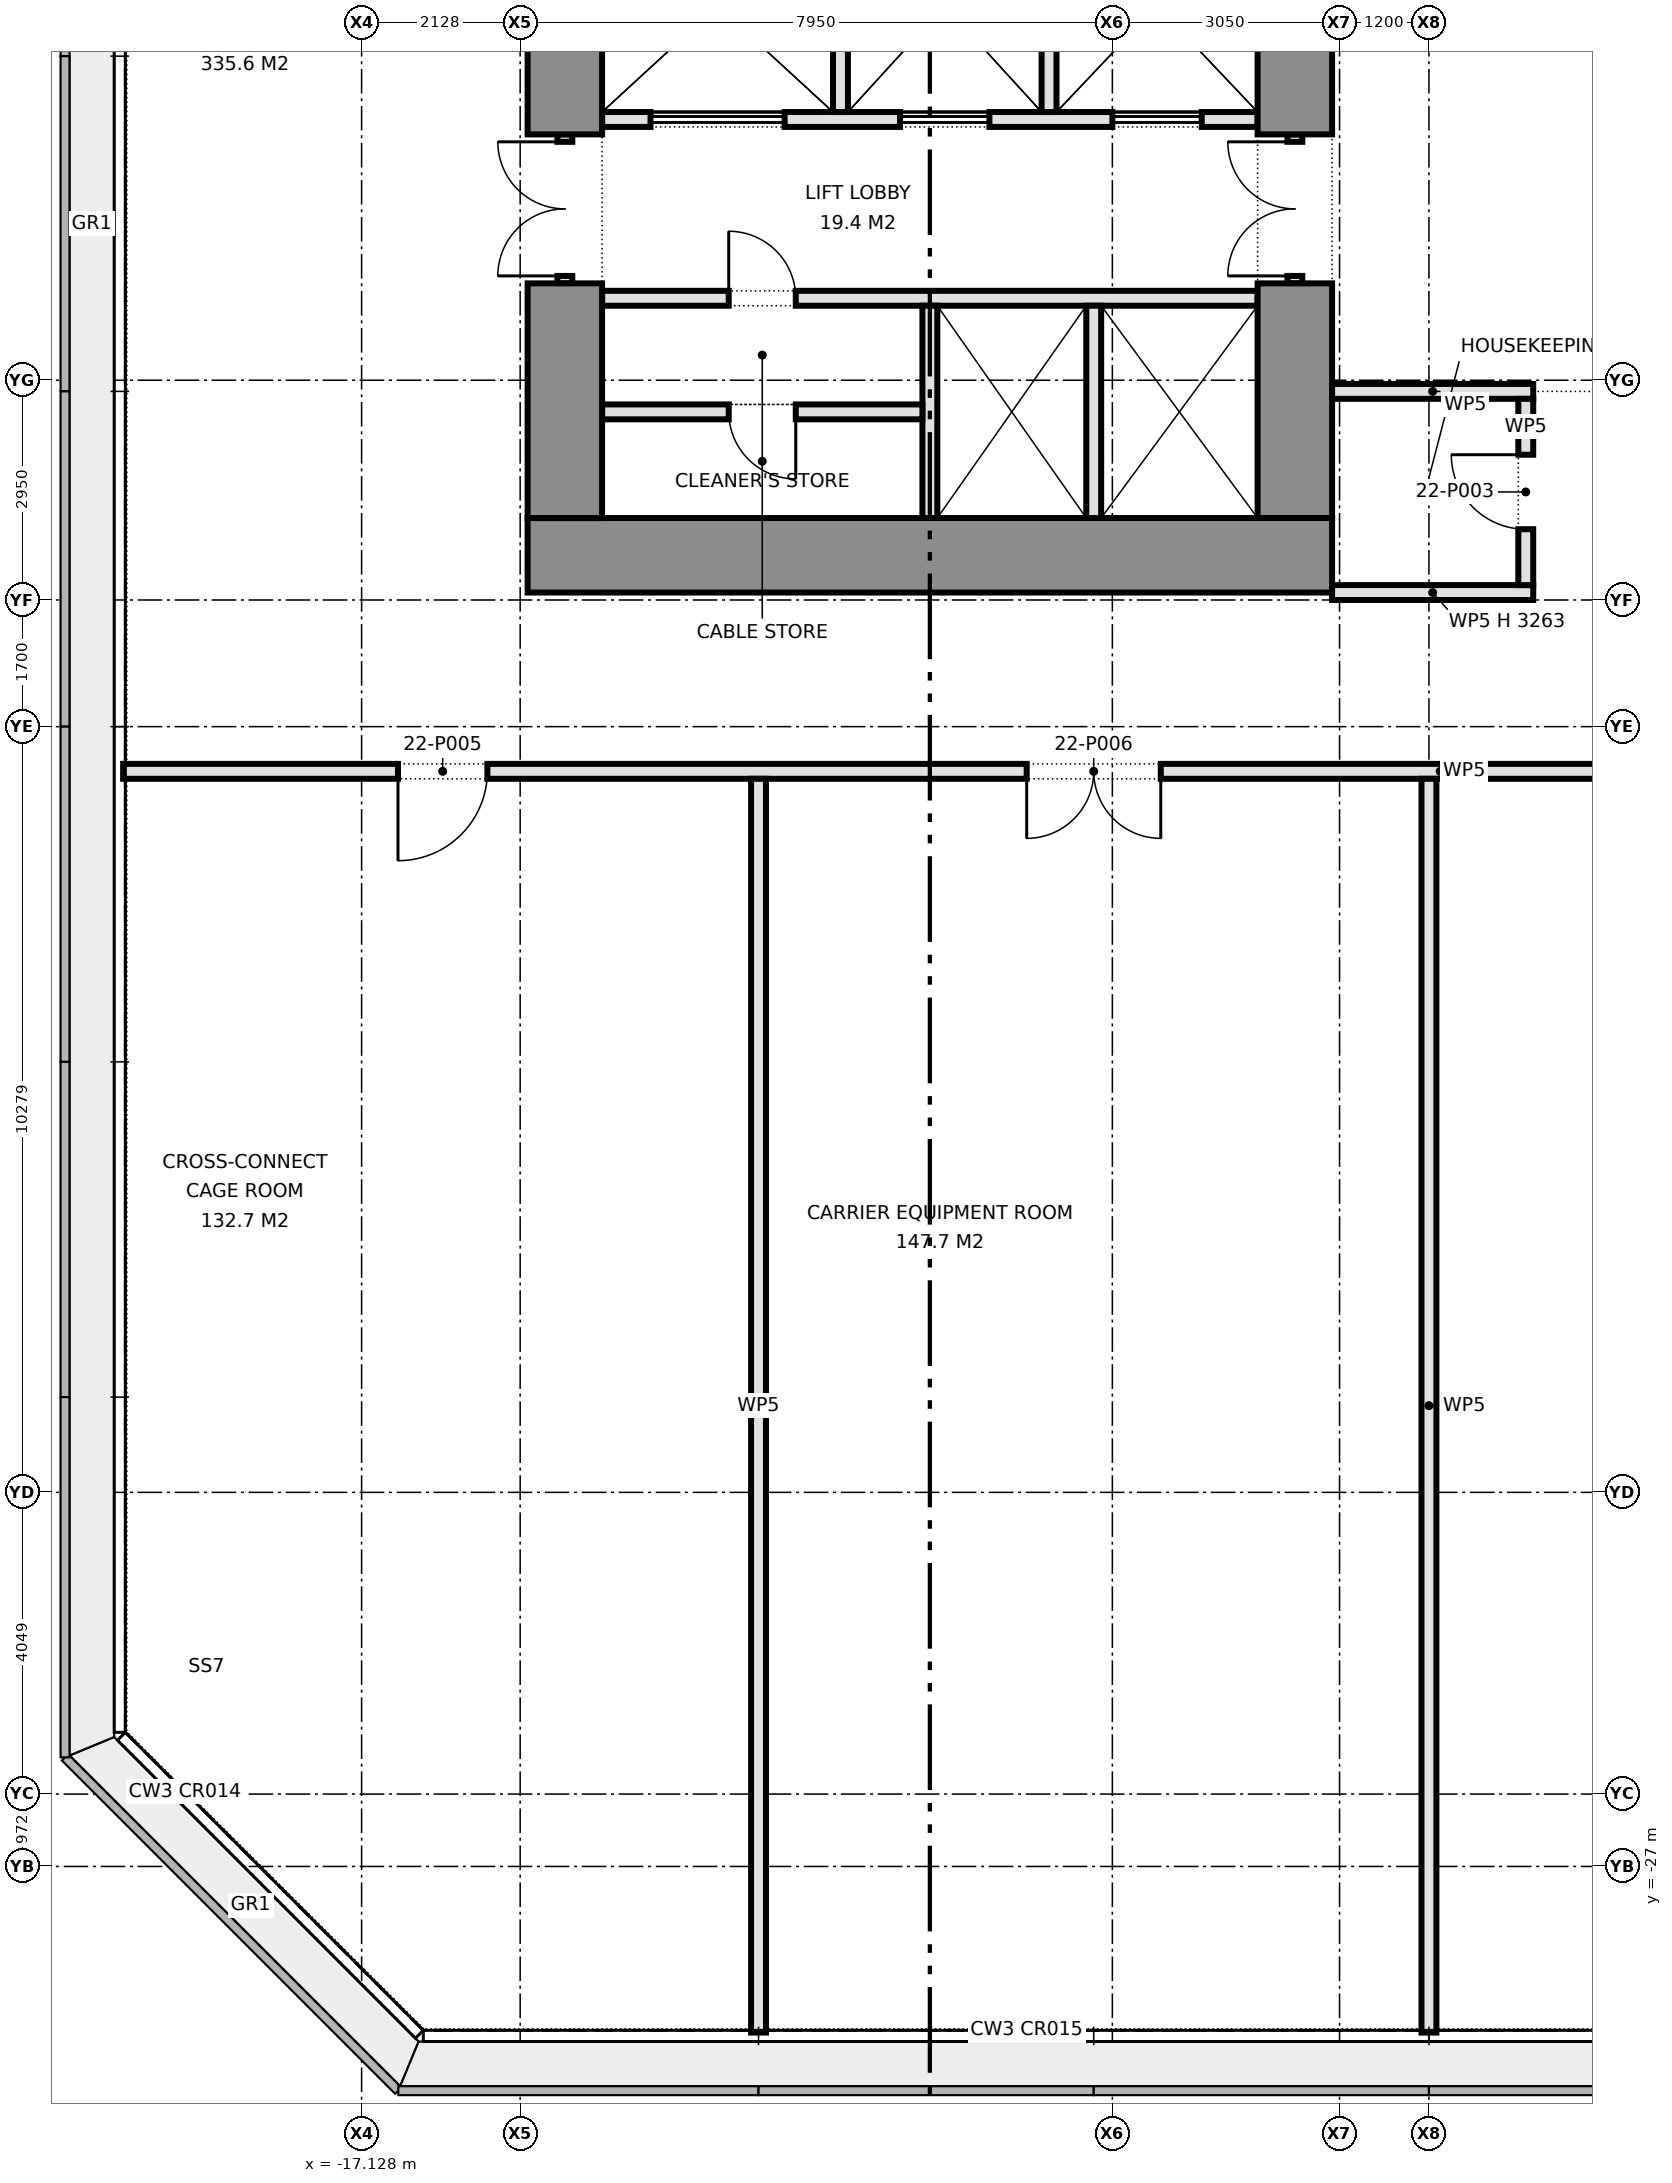
"""IFC4 building model, lengths in metres.
Left out: names, types, materials, properties, quantities, classifications, styles, units other than length and angle.
Written with IfcOpenShell. Run it as: python <this file> out.ifc"""

import sys

from ifc_helpers import new_model, si_unit, direction, frame, frame_2d, origin, place, context, subcontext, project, spatial, rectangle, extrude, element, fill, save


model = new_model("IFC4")
c1 = context("Model", 3, precision=1e-05, world=origin(), true_north=direction((0.0, 1.0)))
c2 = subcontext(c1, "Body", "Model", "MODEL_VIEW")
j1 = project(units=[si_unit("LENGTHUNIT", "METRE"), si_unit("PLANEANGLEUNIT", "RADIAN")], contexts=[c1])
p1 = place(None, origin())
s1 = spatial("IfcSite", under=j1, at=p1, CompositionType="ELEMENT")
p2 = place(p1, origin())
s2 = spatial("IfcBuilding", under=s1, at=p2, CompositionType="ELEMENT")
p3 = place(p2, frame((0.0, 0.0, 99.6)))
s3 = spatial("IfcBuildingStorey", under=s2, at=p3, CompositionType="ELEMENT", Elevation=99.6)
p4 = place(p3, frame((-14.9, -9.4, 0.0), z_axis=(0.0, 0.0, 1.0), x_axis=(1.0, 0.0, 0.0)))
e1 = element("IfcWall", 1, at=p4, inside=s3, PredefinedType="SHEAR", context=c2, shape_type="SweptSolid", body=[
    extrude(rectangle(XDim=10.8, YDim=1.0, at=frame_2d((5.4, 0.0))), origin(), (0.0, 0.0, 1.0), 4.2),
])
p5 = place(p3, frame((-14.4, -8.9, 0.0), z_axis=(0.0, 0.0, 1.0), x_axis=(0.0, 1.0, 0.0)))
e2 = element("IfcWall", 2, at=p5, inside=s3, PredefinedType="SHEAR", context=c2, shape_type="SweptSolid", body=[
    extrude(rectangle(XDim=3.15, YDim=1.0, at=frame_2d((1.575, 0.0))), origin(), (0.0, 0.0, 1.0), 4.2),
])
p6 = place(p3, frame((-14.4, -5.75, 0.0), z_axis=(0.0, 0.0, 1.0), x_axis=(0.0, 1.0, 0.0)))
e3 = element("IfcWall", 3, at=p6, inside=s3, PredefinedType="PARTITIONING", context=c2, shape_type="SweptSolid", body=[
    extrude(rectangle(XDim=2.0, YDim=0.2, at=frame_2d((1.0, 0.0))), origin(), (0.0, 0.0, 1.0), 2.4),
])
p7 = place(p6, frame((0.1, 0.0, 0.0)))
e4 = element("IfcOpeningElement", 4, at=p7, cuts=e3, PredefinedType="OPENING", context=c2, shape_type="SweptSolid", body=[
    extrude(rectangle(XDim=1.8, YDim=2.1, at=frame_2d((0.9, 1.05))), frame((0.0, 0.11, 0.0), z_axis=(0.0, -1.0, 0.0), x_axis=(1.0, 0.0, 0.0)), (0.0, 0.0, 1.0), 0.22),
])
p8 = place(p3, frame((-14.4, -3.75, 0.0), z_axis=(0.0, 0.0, 1.0), x_axis=(0.0, 1.0, 0.0)))
e5 = element("IfcWall", 5, at=p8, inside=s3, PredefinedType="SHEAR", context=c2, shape_type="SweptSolid", body=[
    extrude(rectangle(XDim=6.13, YDim=1.0, at=frame_2d((3.065, 0.0))), origin(), (0.0, 0.0, 1.0), 4.2),
])
p9 = place(p3, frame((-4.6, -8.9, 0.0), z_axis=(0.0, 0.0, 1.0), x_axis=(0.0, 1.0, 0.0)))
e6 = element("IfcWall", 6, at=p9, inside=s3, PredefinedType="SHEAR", context=c2, shape_type="SweptSolid", body=[
    extrude(rectangle(XDim=3.15, YDim=1.0, at=frame_2d((1.575, 0.0))), origin(), (0.0, 0.0, 1.0), 4.2),
])
p10 = place(p3, frame((-4.6, -5.75, 0.0), z_axis=(0.0, 0.0, 1.0), x_axis=(0.0, 1.0, 0.0)))
e7 = element("IfcWall", 7, at=p10, inside=s3, PredefinedType="PARTITIONING", context=c2, shape_type="SweptSolid", body=[
    extrude(rectangle(XDim=2.0, YDim=0.2, at=frame_2d((1.0, 0.0))), origin(), (0.0, 0.0, 1.0), 2.4),
])
p11 = place(p10, frame((0.1, 0.0, 0.0)))
e8 = element("IfcOpeningElement", 8, at=p11, cuts=e7, PredefinedType="OPENING", context=c2, shape_type="SweptSolid", body=[
    extrude(rectangle(XDim=1.8, YDim=2.1, at=frame_2d((0.9, 1.05))), frame((0.0, 0.11, 0.0), z_axis=(0.0, -1.0, 0.0), x_axis=(1.0, 0.0, 0.0)), (0.0, 0.0, 1.0), 0.22),
])
p12 = place(p3, frame((-4.6, -3.75, 0.0), z_axis=(0.0, 0.0, 1.0), x_axis=(0.0, 1.0, 0.0)))
e9 = element("IfcWall", 9, at=p12, inside=s3, PredefinedType="SHEAR", context=c2, shape_type="SweptSolid", body=[
    extrude(rectangle(XDim=4.0, YDim=1.0, at=frame_2d((2.0, 0.0))), origin(), (0.0, 0.0, 1.0), 4.2),
])
p13 = place(p3, frame((-13.9, -5.95, 0.0), z_axis=(0.0, 0.0, 1.0), x_axis=(1.0, 0.0, 0.0)))
e10 = element("IfcWall", 10, at=p13, inside=s3, PredefinedType="PARTITIONING", context=c2, shape_type="SweptSolid", body=[
    extrude(rectangle(XDim=8.8, YDim=0.2, at=frame_2d((4.4, 0.0))), origin(), (0.0, 0.0, 1.0), 4.2),
])
p14 = place(p13, frame((1.7, 0.0, 0.0)))
e11 = element("IfcOpeningElement", 11, at=p14, cuts=e10, PredefinedType="OPENING", context=c2, shape_type="SweptSolid", body=[
    extrude(rectangle(XDim=0.9, YDim=2.1, at=frame_2d((0.45, 1.05))), frame((0.0, 0.11, 0.0), z_axis=(0.0, -1.0, 0.0), x_axis=(1.0, 0.0, 0.0)), (0.0, 0.0, 1.0), 0.22),
])
p15 = place(p3, frame((-13.9, -3.55, 0.0), z_axis=(0.0, 0.0, 1.0), x_axis=(1.0, 0.0, 0.0)))
e12 = element("IfcWall", 12, at=p15, inside=s3, PredefinedType="PARTITIONING", context=c2, shape_type="SweptSolid", body=[
    extrude(rectangle(XDim=8.8, YDim=0.2, at=frame_2d((4.4, 0.0))), origin(), (0.0, 0.0, 1.0), 4.2),
])
p16 = place(p15, frame((0.65, 0.0, 0.0)))
e13 = element("IfcOpeningElement", 13, at=p16, cuts=e12, PredefinedType="OPENING", context=c2, shape_type="SweptSolid", body=[
    extrude(rectangle(XDim=1.8, YDim=2.1, at=frame_2d((0.9, 1.05))), frame((0.0, 0.11, 0.0), z_axis=(0.0, -1.0, 0.0), x_axis=(1.0, 0.0, 0.0)), (0.0, 0.0, 1.0), 0.22),
])
p17 = place(p15, frame((4.0, 0.0, 0.0)))
e14 = element("IfcOpeningElement", 14, at=p17, cuts=e12, PredefinedType="OPENING", context=c2, shape_type="SweptSolid", body=[
    extrude(rectangle(XDim=1.2, YDim=2.1, at=frame_2d((0.6, 1.05))), frame((0.0, 0.11, 0.0), z_axis=(0.0, -1.0, 0.0), x_axis=(1.0, 0.0, 0.0)), (0.0, 0.0, 1.0), 0.22),
])
p18 = place(p15, frame((6.85, 0.0, 0.0)))
e15 = element("IfcOpeningElement", 15, at=p18, cuts=e12, PredefinedType="OPENING", context=c2, shape_type="SweptSolid", body=[
    extrude(rectangle(XDim=1.2, YDim=2.1, at=frame_2d((0.6, 1.05))), frame((0.0, 0.11, 0.0), z_axis=(0.0, -1.0, 0.0), x_axis=(1.0, 0.0, 0.0)), (0.0, 0.0, 1.0), 0.22),
])
for number, where, z_axis, x_axis in (
    (16, (-9.5, -8.9, 0.0), (0.0, 0.0, 1.0), (0.0, 1.0, 0.0)),
    (17, (-7.3, -8.9, 0.0), (0.0, 0.0, 1.0), (0.0, 1.0, 0.0)),
):
    element("IfcWall", number, at=place(p3, frame(where, z_axis=z_axis, x_axis=x_axis)), inside=s3, PredefinedType="PARTITIONING", context=c2, shape_type="SweptSolid", body=[
        extrude(rectangle(XDim=2.85, YDim=0.2, at=frame_2d((1.425, 0.0))), origin(), (0.0, 0.0, 1.0), 4.2),
    ])
p19 = place(p3, frame((-13.9, -7.475, 0.0), z_axis=(0.0, 0.0, 1.0), x_axis=(1.0, 0.0, 0.0)))
e18 = element("IfcWall", 18, at=p19, inside=s3, PredefinedType="PARTITIONING", context=c2, shape_type="SweptSolid", body=[
    extrude(rectangle(XDim=4.3, YDim=0.2, at=frame_2d((2.15, 0.0))), origin(), (0.0, 0.0, 1.0), 4.2),
])
p20 = place(p19, frame((1.7, 0.0, 0.0)))
e19 = element("IfcOpeningElement", 19, at=p20, cuts=e18, PredefinedType="OPENING", context=c2, shape_type="SweptSolid", body=[
    extrude(rectangle(XDim=0.9, YDim=2.1, at=frame_2d((0.45, 1.05))), frame((0.0, 0.11, 0.0), z_axis=(0.0, -1.0, 0.0), x_axis=(1.0, 0.0, 0.0)), (0.0, 0.0, 1.0), 0.22),
])
for number, where, z_axis, x_axis in (
    (20, (-10.7, -3.45, 0.0), (0.0, 0.0, 1.0), (0.0, 1.0, 0.0)),
    (21, (-7.9, -3.45, 0.0), (0.0, 0.0, 1.0), (0.0, 1.0, 0.0)),
):
    element("IfcWall", number, at=place(p3, frame(where, z_axis=z_axis, x_axis=x_axis)), inside=s3, PredefinedType="PARTITIONING", context=c2, shape_type="SweptSolid", body=[
        extrude(rectangle(XDim=2.85, YDim=0.2, at=frame_2d((1.425, 0.0))), origin(), (0.0, 0.0, 1.0), 4.2),
    ])
p21 = place(p3, frame((-20.33, -12.3, 0.0), z_axis=(0.0, 0.0, 1.0), x_axis=(1.0, 0.0, 0.0)))
e22 = element("IfcWall", 22, at=p21, inside=s3, PredefinedType="PARTITIONING", context=c2, shape_type="SweptSolid", body=[
    extrude(rectangle(XDim=37.73, YDim=0.2, at=frame_2d((18.865, 0.0))), origin(), (0.0, 0.0, 1.0), 4.2),
])
p22 = place(p21, frame((3.69, 0.0, 0.0)))
e23 = element("IfcOpeningElement", 23, at=p22, cuts=e22, PredefinedType="OPENING", context=c2, shape_type="SweptSolid", body=[
    extrude(rectangle(XDim=1.2, YDim=2.1, at=frame_2d((0.6, 1.05))), frame((0.0, 0.11, 0.0), z_axis=(0.0, -1.0, 0.0), x_axis=(1.0, 0.0, 0.0)), (0.0, 0.0, 1.0), 0.22),
])
p23 = place(p21, frame((12.13, 0.0, 0.0)))
e24 = element("IfcOpeningElement", 24, at=p23, cuts=e22, PredefinedType="OPENING", context=c2, shape_type="SweptSolid", body=[
    extrude(rectangle(XDim=1.8, YDim=2.1, at=frame_2d((0.9, 1.05))), frame((0.0, 0.11, 0.0), z_axis=(0.0, -1.0, 0.0), x_axis=(1.0, 0.0, 0.0)), (0.0, 0.0, 1.0), 0.22),
])
p24 = place(p21, frame((21.43, 0.0, 0.0)))
e25 = element("IfcOpeningElement", 25, at=p24, cuts=e22, PredefinedType="OPENING", context=c2, shape_type="SweptSolid", body=[
    extrude(rectangle(XDim=1.2, YDim=2.1, at=frame_2d((0.6, 1.05))), frame((0.0, 0.11, 0.0), z_axis=(0.0, -1.0, 0.0), x_axis=(1.0, 0.0, 0.0)), (0.0, 0.0, 1.0), 0.22),
])
p25 = place(p21, frame((35.285, 0.0, 0.0)))
e26 = element("IfcOpeningElement", 26, at=p25, cuts=e22, PredefinedType="OPENING", context=c2, shape_type="SweptSolid", body=[
    extrude(rectangle(XDim=1.8, YDim=2.1, at=frame_2d((0.9, 1.05))), frame((0.0, 0.11, 0.0), z_axis=(0.0, -1.0, 0.0), x_axis=(1.0, 0.0, 0.0)), (0.0, 0.0, 1.0), 0.22),
])
p26 = place(p21, frame((27.53, 0.0, 0.0)))
e27 = element("IfcOpeningElement", 27, at=p26, cuts=e22, PredefinedType="OPENING", context=c2, shape_type="SweptSolid", body=[
    extrude(rectangle(XDim=1.0, YDim=2.1, at=frame_2d((0.5, 1.05))), frame((0.0, 0.11, 0.0), z_axis=(0.0, -1.0, 0.0), x_axis=(1.0, 0.0, 0.0)), (0.0, 0.0, 1.0), 0.22),
])
p27 = place(p21, frame((30.53, 0.0, 0.0)))
e28 = element("IfcOpeningElement", 28, at=p27, cuts=e22, PredefinedType="OPENING", context=c2, shape_type="SweptSolid", body=[
    extrude(rectangle(XDim=1.0, YDim=2.1, at=frame_2d((0.5, 1.05))), frame((0.0, 0.11, 0.0), z_axis=(0.0, -1.0, 0.0), x_axis=(1.0, 0.0, 0.0)), (0.0, 0.0, 1.0), 0.22),
])
p28 = place(p21, frame((33.13, 0.0, 0.0)))
e29 = element("IfcOpeningElement", 29, at=p28, cuts=e22, PredefinedType="OPENING", context=c2, shape_type="SweptSolid", body=[
    extrude(rectangle(XDim=1.0, YDim=2.1, at=frame_2d((0.5, 1.05))), frame((0.0, 0.11, 0.0), z_axis=(0.0, -1.0, 0.0), x_axis=(1.0, 0.0, 0.0)), (0.0, 0.0, 1.0), 0.22),
])
p29 = place(p3, frame((-4.1, -9.9, 0.0), z_axis=(0.0, 0.0, 1.0), x_axis=(1.0, 0.0, 0.0)))
e30 = element("IfcWall", 30, at=p29, inside=s3, PredefinedType="PARTITIONING", context=c2, shape_type="SweptSolid", body=[
    extrude(rectangle(XDim=2.7, YDim=0.2, at=frame_2d((1.35, 0.0))), origin(), (0.0, 0.0, 1.0), 3.263),
])
p30 = place(p3, frame((-4.1, -7.2, 0.0), z_axis=(0.0, 0.0, 1.0), x_axis=(1.0, 0.0, 0.0)))
e31 = element("IfcWall", 31, at=p30, inside=s3, PredefinedType="PARTITIONING", context=c2, shape_type="SweptSolid", body=[
    extrude(rectangle(XDim=2.7, YDim=0.2, at=frame_2d((1.35, 0.0))), origin(), (0.0, 0.0, 1.0), 4.2),
])
p31 = place(p3, frame((-1.5, -9.8, 0.0), z_axis=(0.0, 0.0, 1.0), x_axis=(0.0, 1.0, 0.0)))
e32 = element("IfcWall", 32, at=p31, inside=s3, PredefinedType="PARTITIONING", context=c2, shape_type="SweptSolid", body=[
    extrude(rectangle(XDim=2.5, YDim=0.2, at=frame_2d((1.25, 0.0))), origin(), (0.0, 0.0, 1.0), 4.2),
])
p32 = place(p31, frame((0.75, 0.0, 0.0)))
e33 = element("IfcOpeningElement", 33, at=p32, cuts=e32, PredefinedType="OPENING", context=c2, shape_type="SweptSolid", body=[
    extrude(rectangle(XDim=1.0, YDim=2.1, at=frame_2d((0.5, 1.05))), frame((0.0, 0.11, 0.0), z_axis=(0.0, -1.0, 0.0), x_axis=(1.0, 0.0, 0.0)), (0.0, 0.0, 1.0), 0.22),
])
for number, where, z_axis, x_axis in (
    (34, (-2.8, -29.23, 0.0), (0.0, 0.0, 1.0), (0.0, 1.0, 0.0)),
    (35, (-11.8, -29.23, 0.0), (0.0, 0.0, 1.0), (0.0, 1.0, 0.0)),
):
    element("IfcWall", number, at=place(p3, frame(where, z_axis=z_axis, x_axis=x_axis)), inside=s3, PredefinedType="PARTITIONING", context=c2, shape_type="SweptSolid", body=[
        extrude(rectangle(XDim=16.83, YDim=0.2, at=frame_2d((8.415, 0.0))), origin(), (0.0, 0.0, 1.0), 4.2),
    ])
p33 = place(p7, origin())
e36 = element("IfcDoor", 36, at=p33, inside=s3, OperationType="DOUBLE_DOOR_SINGLE_SWING", PredefinedType="DOOR", context=c2, shape_type="SweptSolid", body=[
    extrude(rectangle(XDim=1.8, YDim=2.1, at=frame_2d((0.9, 1.05))), frame((0.0, 0.025, 0.0), z_axis=(0.0, -1.0, 0.0), x_axis=(1.0, 0.0, 0.0)), (0.0, 0.0, 1.0), 0.05),
])
fill(e4, e36)
p34 = place(p11, origin())
e37 = element("IfcDoor", 37, at=p34, inside=s3, OperationType="DOUBLE_DOOR_SINGLE_SWING", PredefinedType="DOOR", context=c2, shape_type="SweptSolid", body=[
    extrude(rectangle(XDim=1.8, YDim=2.1, at=frame_2d((0.9, 1.05))), frame((0.0, 0.025, 0.0), z_axis=(0.0, -1.0, 0.0), x_axis=(1.0, 0.0, 0.0)), (0.0, 0.0, 1.0), 0.05),
])
fill(e8, e37)
p35 = place(p16, origin())
e38 = element("IfcDoor", 38, at=p35, inside=s3, OperationType="DOUBLE_DOOR_SLIDING", PredefinedType="DOOR", context=c2, shape_type="SweptSolid", body=[
    extrude(rectangle(XDim=1.8, YDim=2.1, at=frame_2d((0.9, 1.05))), frame((0.0, 0.025, 0.0), z_axis=(0.0, -1.0, 0.0), x_axis=(1.0, 0.0, 0.0)), (0.0, 0.0, 1.0), 0.05),
])
fill(e13, e38)
p36 = place(p17, origin())
e39 = element("IfcDoor", 39, at=p36, inside=s3, OperationType="DOUBLE_DOOR_SLIDING", PredefinedType="DOOR", context=c2, shape_type="SweptSolid", body=[
    extrude(rectangle(XDim=1.2, YDim=2.1, at=frame_2d((0.6, 1.05))), frame((0.0, 0.025, 0.0), z_axis=(0.0, -1.0, 0.0), x_axis=(1.0, 0.0, 0.0)), (0.0, 0.0, 1.0), 0.05),
])
fill(e14, e39)
p37 = place(p18, origin())
e40 = element("IfcDoor", 40, at=p37, inside=s3, OperationType="DOUBLE_DOOR_SLIDING", PredefinedType="DOOR", context=c2, shape_type="SweptSolid", body=[
    extrude(rectangle(XDim=1.2, YDim=2.1, at=frame_2d((0.6, 1.05))), frame((0.0, 0.025, 0.0), z_axis=(0.0, -1.0, 0.0), x_axis=(1.0, 0.0, 0.0)), (0.0, 0.0, 1.0), 0.05),
])
fill(e15, e40)
p38 = place(p14, origin())
e41 = element("IfcDoor", 41, at=p38, inside=s3, OperationType="SINGLE_SWING_LEFT", PredefinedType="DOOR", context=c2, shape_type="SweptSolid", body=[
    extrude(rectangle(XDim=0.9, YDim=2.1, at=frame_2d((0.45, 1.05))), frame((0.0, 0.025, 0.0), z_axis=(0.0, -1.0, 0.0), x_axis=(1.0, 0.0, 0.0)), (0.0, 0.0, 1.0), 0.05),
])
fill(e11, e41)
p39 = place(p20, frame((0.9, 0.0, 0.0), z_axis=(0.0, 0.0, 1.0), x_axis=(-1.0, 0.0, 0.0)))
e42 = element("IfcDoor", 42, at=p39, inside=s3, OperationType="SINGLE_SWING_LEFT", PredefinedType="DOOR", context=c2, shape_type="SweptSolid", body=[
    extrude(rectangle(XDim=0.9, YDim=2.1, at=frame_2d((0.45, 1.05))), frame((0.0, 0.025, 0.0), z_axis=(0.0, -1.0, 0.0), x_axis=(1.0, 0.0, 0.0)), (0.0, 0.0, 1.0), 0.05),
])
fill(e19, e42)
p40 = place(p32, origin())
e43 = element("IfcDoor", 43, at=p40, inside=s3, OperationType="SINGLE_SWING_RIGHT", PredefinedType="DOOR", context=c2, shape_type="SweptSolid", body=[
    extrude(rectangle(XDim=1.0, YDim=2.1, at=frame_2d((0.5, 1.05))), frame((0.0, 0.025, 0.0), z_axis=(0.0, -1.0, 0.0), x_axis=(1.0, 0.0, 0.0)), (0.0, 0.0, 1.0), 0.05),
])
fill(e33, e43)
p41 = place(p22, frame((1.2, 0.0, 0.0), z_axis=(0.0, 0.0, 1.0), x_axis=(-1.0, 0.0, 0.0)))
e44 = element("IfcDoor", 44, at=p41, inside=s3, OperationType="SINGLE_SWING_RIGHT", PredefinedType="DOOR", context=c2, shape_type="SweptSolid", body=[
    extrude(rectangle(XDim=1.2, YDim=2.1, at=frame_2d((0.6, 1.05))), frame((0.0, 0.025, 0.0), z_axis=(0.0, -1.0, 0.0), x_axis=(1.0, 0.0, 0.0)), (0.0, 0.0, 1.0), 0.05),
])
fill(e23, e44)
p42 = place(p23, frame((1.8, 0.0, 0.0), z_axis=(0.0, 0.0, 1.0), x_axis=(-1.0, 0.0, 0.0)))
e45 = element("IfcDoor", 45, at=p42, inside=s3, OperationType="DOUBLE_DOOR_SINGLE_SWING", PredefinedType="DOOR", context=c2, shape_type="SweptSolid", body=[
    extrude(rectangle(XDim=1.8, YDim=2.1, at=frame_2d((0.9, 1.05))), frame((0.0, 0.025, 0.0), z_axis=(0.0, -1.0, 0.0), x_axis=(1.0, 0.0, 0.0)), (0.0, 0.0, 1.0), 0.05),
])
fill(e24, e45)
save(model, sys.argv[1])
